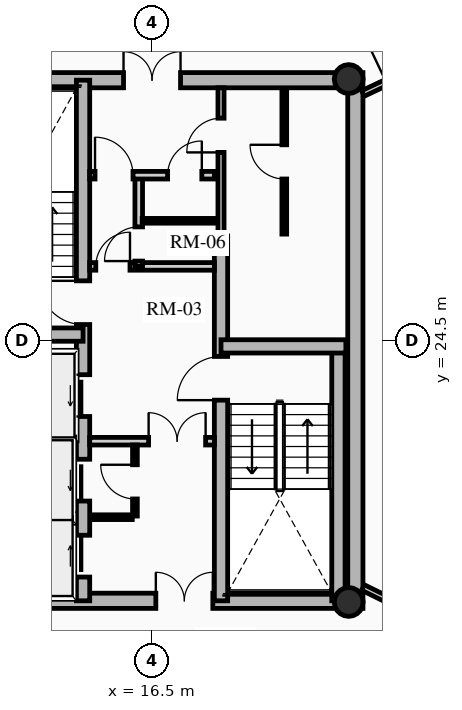
"""IFC4 building model, lengths in metres.
Left out: names, types, materials, properties, quantities, classifications, styles, units other than length and angle.
Written with IfcOpenShell. Run it as: python <this file> out.ifc"""

import sys

from ifc_helpers import new_model, si_unit, direction, frame, frame_2d, origin, origin_2d, place, context, subcontext, project, spatial, rectangle, hollow_circle, extrude, source, transform, mapped, element, fill, save


model = new_model("IFC4")
c1 = context("Model", 3, precision=1e-05, world=origin(), true_north=direction((0.0, 1.0)))
c2 = subcontext(c1, "Body", "Model", "MODEL_VIEW")
j1 = project(units=[si_unit("LENGTHUNIT", "METRE"), si_unit("PLANEANGLEUNIT", "RADIAN")], contexts=[c1])
p1 = place(None, origin())
s1 = spatial("IfcSite", under=j1, at=p1, CompositionType="ELEMENT")
p2 = place(p1, origin())
s2 = spatial("IfcBuilding", under=s1, at=p2, CompositionType="ELEMENT")
p3 = place(p2, frame((0.0, 0.0, 171.97)))
s3 = spatial("IfcBuildingStorey", under=s2, at=p3, CompositionType="ELEMENT", Elevation=171.97)
p4 = place(p3, frame((21.85, 17.45, 0.0), z_axis=(0.0, 0.0, 1.0), x_axis=(0.0, 1.0, 0.0)))
e1 = element("IfcWall", 1, at=p4, inside=s3, PredefinedType="SHEAR", context=c2, shape_type="SweptSolid", body=[
    extrude(rectangle(XDim=14.1, YDim=0.4, at=frame_2d((7.05, 0.0))), origin(), (0.0, 0.0, 1.0), 2.91),
])
p5 = place(p3, frame((11.15, 17.65, 0.0), z_axis=(0.0, 0.0, 1.0), x_axis=(1.0, 0.0, 0.0)))
e2 = element("IfcWall", 2, at=p5, inside=s3, PredefinedType="SHEAR", context=c2, shape_type="SweptSolid", body=[
    extrude(rectangle(XDim=10.7, YDim=0.4, at=frame_2d((5.35, 0.0))), origin(), (0.0, 0.0, 1.0), 2.91),
])
m1 = source(origin(), c2, "Body", "SweptSolid", [
    extrude(rectangle(XDim=1.5, YDim=2.02, at=frame_2d((0.75, 1.01))), frame((0.0, 0.21, 0.0), z_axis=(0.0, -1.0, 0.0), x_axis=(1.0, 0.0, 0.0)), (0.0, 0.0, 1.0), 0.42),
])
p6 = place(p5, frame((5.45, 0.0, 0.0)))
e3 = element("IfcOpeningElement", 3, at=p6, cuts=e2, PredefinedType="OPENING", context=c2, shape_type="MappedRepresentation", body=[
    mapped(m1, transform((0.0, 0.0, 0.0), x_axis=(1.0, 0.0, 0.0), y_axis=(0.0, 1.0, 0.0), z_axis=(0.0, 0.0, 1.0), scale=1.0)),
])
p7 = place(p3, frame((11.15, 31.35, 0.0), z_axis=(0.0, 0.0, 1.0), x_axis=(1.0, 0.0, 0.0)))
e4 = element("IfcWall", 4, at=p7, inside=s3, PredefinedType="SHEAR", context=c2, shape_type="SweptSolid", body=[
    extrude(rectangle(XDim=10.7, YDim=0.4, at=frame_2d((5.35, 0.0))), origin(), (0.0, 0.0, 1.0), 2.91),
])
p8 = place(p7, frame((4.6, 0.0, 0.0)))
e5 = element("IfcOpeningElement", 5, at=p8, cuts=e4, PredefinedType="OPENING", context=c2, shape_type="MappedRepresentation", body=[
    mapped(m1, transform((0.0, 0.0, 0.0), x_axis=(1.0, 0.0, 0.0), y_axis=(0.0, 1.0, 0.0), z_axis=(0.0, 0.0, 1.0), scale=1.0)),
])
p9 = place(p3, frame((14.685, 17.65, 0.0), z_axis=(0.0, 0.0, 1.0), x_axis=(0.0, 1.0, 0.0)))
e6 = element("IfcWall", 6, at=p9, inside=s3, PredefinedType="SHEAR", context=c2, shape_type="SweptSolid", body=[
    extrude(rectangle(XDim=13.7, YDim=0.35, at=frame_2d((6.85, 0.0))), origin(), (0.0, 0.0, 1.0), 2.91),
])
m2 = source(origin(), c2, "Body", "SweptSolid", [
    extrude(rectangle(XDim=1.1, YDim=2.015, at=frame_2d((0.55, 1.007))), frame((0.0, 0.185, 0.0), z_axis=(0.0, -1.0, 0.0), x_axis=(1.0, 0.0, 0.0)), (0.0, 0.0, 1.0), 0.37),
])
p10 = place(p9, frame((4.85, 0.0, 0.0)))
e7 = element("IfcOpeningElement", 7, at=p10, cuts=e6, PredefinedType="OPENING", context=c2, shape_type="MappedRepresentation", body=[
    mapped(m2, transform((0.0, 0.0, 0.0), x_axis=(1.0, 0.0, 0.0), y_axis=(0.0, 1.0, 0.0), z_axis=(0.0, 0.0, 1.0), scale=1.0)),
])
p11 = place(p9, frame((0.625, 0.0, 0.0)))
e8 = element("IfcOpeningElement", 8, at=p11, cuts=e6, PredefinedType="OPENING", context=c2, shape_type="MappedRepresentation", body=[
    mapped(m2, transform((0.0, 0.0, 0.0), x_axis=(1.0, 0.0, 0.0), y_axis=(0.0, 1.0, 0.0), z_axis=(0.0, 0.0, 1.0), scale=1.0)),
])
p12 = place(p9, frame((2.625, 0.0, 0.0)))
e9 = element("IfcOpeningElement", 9, at=p12, cuts=e6, PredefinedType="OPENING", context=c2, shape_type="MappedRepresentation", body=[
    mapped(m2, transform((0.0, 0.0, 0.0), x_axis=(1.0, 0.0, 0.0), y_axis=(0.0, 1.0, 0.0), z_axis=(0.0, 0.0, 1.0), scale=1.0)),
])
m3 = source(origin(), c2, "Body", "SweptSolid", [
    extrude(rectangle(XDim=1.15, YDim=2.02, at=frame_2d((0.575, 1.01))), frame((0.0, 0.185, 0.0), z_axis=(0.0, -1.0, 0.0), x_axis=(1.0, 0.0, 0.0)), (0.0, 0.0, 1.0), 0.37),
])
p13 = place(p9, frame((7.27, 0.0, 0.0)))
e10 = element("IfcOpeningElement", 10, at=p13, cuts=e6, PredefinedType="OPENING", context=c2, shape_type="MappedRepresentation", body=[
    mapped(m3, transform((0.0, 0.0, 0.0), x_axis=(1.0, 0.0, 0.0), y_axis=(0.0, 1.0, 0.0), z_axis=(0.0, 0.0, 1.0), scale=1.0)),
])
p14 = place(p3, frame((18.315, 17.65, 0.0), z_axis=(0.0, 0.0, 1.0), x_axis=(0.0, 1.0, 0.0)))
e11 = element("IfcWall", 11, at=p14, inside=s3, PredefinedType="SHEAR", context=c2, shape_type="SweptSolid", body=[
    extrude(rectangle(XDim=9.6, YDim=0.35, at=frame_2d((4.8, 0.0))), origin(), (0.0, 0.0, 1.0), 2.91),
])
p15 = place(p14, frame((5.28, 0.0, 0.0)))
e12 = element("IfcOpeningElement", 12, at=p15, cuts=e11, PredefinedType="OPENING", context=c2, shape_type="MappedRepresentation", body=[
    mapped(m3, transform((0.0, 0.0, 0.0), x_axis=(1.0, 0.0, 0.0), y_axis=(0.0, 1.0, 0.0), z_axis=(0.0, 0.0, 1.0), scale=1.0)),
])
p16 = place(p3, frame((11.4, 24.655, 0.0), z_axis=(0.0, 0.0, 1.0), x_axis=(1.0, 0.0, 0.0)))
e13 = element("IfcWall", 13, at=p16, inside=s3, PredefinedType="SHEAR", context=c2, shape_type="SweptSolid", body=[
    extrude(rectangle(XDim=3.285, YDim=0.35, at=frame_2d((1.643, 0.0))), origin(), (0.0, 0.0, 1.0), 2.91),
])
p17 = place(p3, frame((21.405, 17.65, 0.0), z_axis=(0.0, 0.0, 1.0), x_axis=(0.0, 1.0, 0.0)))
e14 = element("IfcWall", 14, at=p17, inside=s3, PredefinedType="SHEAR", context=c2, shape_type="SweptSolid", body=[
    extrude(rectangle(XDim=6.695, YDim=0.35, at=frame_2d((3.348, 0.0))), origin(), (0.0, 0.0, 1.0), 2.91),
])
p18 = place(p3, frame((18.315, 24.345, 0.0), z_axis=(0.0, 0.0, 1.0), x_axis=(1.0, 0.0, 0.0)))
e15 = element("IfcWall", 15, at=p18, inside=s3, PredefinedType="SHEAR", context=c2, shape_type="SweptSolid", body=[
    extrude(rectangle(XDim=3.285, YDim=0.35, at=frame_2d((1.643, 0.0))), origin(), (0.0, 0.0, 1.0), 2.91),
])
for number, where, z_axis, x_axis in (
    (16, (21.675, 17.62, 0.0), (0.0, 0.0, 1.0), (1.0, 0.0, 0.0)),
    (17, (21.675, 31.38, 0.0), (0.0, 0.0, 1.0), (1.0, 0.0, 0.0)),
):
    element("IfcColumn", number, at=place(p3, frame(where, z_axis=z_axis, x_axis=x_axis)), inside=s3, PredefinedType="COLUMN", context=c2, shape_type="SweptSolid", body=[
        extrude(hollow_circle(Radius=0.38, WallThickness=0.032, at=origin_2d()), origin(), (0.0, 0.0, 1.0), 2.91),
    ])
for number, where, z_axis, x_axis in (
    (18, (11.52, 21.8, 0.0), (0.0, 0.0, 1.0), (1.0, 0.0, 0.0)),
    (19, (11.52, 19.825, 0.0), (0.0, 0.0, 1.0), (1.0, 0.0, 0.0)),
):
    element("IfcWall", number, at=place(p3, frame(where, z_axis=z_axis, x_axis=x_axis)), inside=s3, PredefinedType="SHEAR", context=c2, shape_type="SweptSolid", body=[
        extrude(rectangle(XDim=2.97, YDim=0.2, at=frame_2d((1.485, 0.0))), origin(), (0.0, 0.0, 1.0), 2.91),
    ])
p19 = place(p3, frame((14.86, 21.85, 0.0), z_axis=(0.0, 0.0, 1.0), x_axis=(1.0, 0.0, 0.0)))
e20 = element("IfcWall", 20, at=p19, inside=s3, PredefinedType="PARTITIONING", context=c2, shape_type="SweptSolid", body=[
    extrude(rectangle(XDim=3.28, YDim=0.2, at=frame_2d((1.64, 0.0))), origin(), (0.0, 0.0, 1.0), 2.675),
])
m4 = source(origin(), c2, "Body", "SweptSolid", [
    extrude(rectangle(XDim=1.5, YDim=2.02, at=frame_2d((0.75, 1.01))), frame((0.0, 0.11, 0.0), z_axis=(0.0, -1.0, 0.0), x_axis=(1.0, 0.0, 0.0)), (0.0, 0.0, 1.0), 0.22),
])
p20 = place(p19, frame((1.55, 0.0, 0.0)))
e21 = element("IfcOpeningElement", 21, at=p20, cuts=e20, PredefinedType="OPENING", context=c2, shape_type="MappedRepresentation", body=[
    mapped(m4, transform((0.0, 0.0, 0.0), x_axis=(1.0, 0.0, 0.0), y_axis=(0.0, 1.0, 0.0), z_axis=(0.0, 0.0, 1.0), scale=1.0)),
])
p21 = place(p3, frame((14.86, 26.45, 0.0), z_axis=(0.0, 0.0, 1.0), x_axis=(1.0, 0.0, 0.0)))
e22 = element("IfcWall", 22, at=p21, inside=s3, PredefinedType="PARTITIONING", context=c2, shape_type="SweptSolid", body=[
    extrude(rectangle(XDim=3.28, YDim=0.2, at=frame_2d((1.64, 0.0))), origin(), (0.0, 0.0, 1.0), 2.675),
])
m5 = source(origin(), c2, "Body", "SweptSolid", [
    extrude(rectangle(XDim=0.9, YDim=2.005, at=frame_2d((0.45, 1.002))), frame((0.0, 0.11, 0.0), z_axis=(0.0, -1.0, 0.0), x_axis=(1.0, 0.0, 0.0)), (0.0, 0.0, 1.0), 0.22),
])
p22 = place(p21, frame((0.16, 0.0, 0.0)))
e23 = element("IfcOpeningElement", 23, at=p22, cuts=e22, PredefinedType="OPENING", context=c2, shape_type="MappedRepresentation", body=[
    mapped(m5, transform((0.0, 0.0, 0.0), x_axis=(1.0, 0.0, 0.0), y_axis=(0.0, 1.0, 0.0), z_axis=(0.0, 0.0, 1.0), scale=1.0)),
])
p23 = place(p3, frame((16.15, 26.45, 0.0), z_axis=(0.0, 0.0, 1.0), x_axis=(0.0, 1.0, 0.0)))
e24 = element("IfcWall", 24, at=p23, inside=s3, PredefinedType="PARTITIONING", context=c2, shape_type="SweptSolid", body=[
    extrude(rectangle(XDim=2.4, YDim=0.2, at=frame_2d((1.2, 0.0))), origin(), (0.0, 0.0, 1.0), 2.675),
])
p24 = place(p23, frame((0.14, 0.0, 0.0)))
e25 = element("IfcOpeningElement", 25, at=p24, cuts=e24, PredefinedType="OPENING", context=c2, shape_type="MappedRepresentation", body=[
    mapped(m5, transform((0.0, 0.0, 0.0), x_axis=(1.0, 0.0, 0.0), y_axis=(0.0, 1.0, 0.0), z_axis=(0.0, 0.0, 1.0), scale=1.0)),
])
p25 = place(p3, frame((14.86, 28.85, 0.0), z_axis=(0.0, 0.0, 1.0), x_axis=(1.0, 0.0, 0.0)))
e26 = element("IfcWall", 26, at=p25, inside=s3, PredefinedType="PARTITIONING", context=c2, shape_type="SweptSolid", body=[
    extrude(rectangle(XDim=3.28, YDim=0.2, at=frame_2d((1.64, 0.0))), origin(), (0.0, 0.0, 1.0), 2.675),
])
m6 = source(origin(), c2, "Body", "SweptSolid", [
    extrude(rectangle(XDim=1.0, YDim=2.015, at=frame_2d((0.5, 1.007))), frame((0.0, 0.11, 0.0), z_axis=(0.0, -1.0, 0.0), x_axis=(1.0, 0.0, 0.0)), (0.0, 0.0, 1.0), 0.22),
])
p26 = place(p25, frame((0.14, 0.0, 0.0)))
e27 = element("IfcOpeningElement", 27, at=p26, cuts=e26, PredefinedType="OPENING", context=c2, shape_type="MappedRepresentation", body=[
    mapped(m6, transform((0.0, 0.0, 0.0), x_axis=(1.0, 0.0, 0.0), y_axis=(0.0, 1.0, 0.0), z_axis=(0.0, 0.0, 1.0), scale=1.0)),
])
p27 = place(p25, frame((2.05, 0.0, 0.0)))
e28 = element("IfcOpeningElement", 28, at=p27, cuts=e26, PredefinedType="OPENING", context=c2, shape_type="MappedRepresentation", body=[
    mapped(m5, transform((0.0, 0.0, 0.0), x_axis=(1.0, 0.0, 0.0), y_axis=(0.0, 1.0, 0.0), z_axis=(0.0, 0.0, 1.0), scale=1.0)),
])
p28 = place(p3, frame((16.05, 19.88, 0.0), z_axis=(0.0, 0.0, 1.0), x_axis=(0.0, 1.0, 0.0)))
e29 = element("IfcWall", 29, at=p28, inside=s3, PredefinedType="PARTITIONING", context=c2, shape_type="SweptSolid", body=[
    extrude(rectangle(XDim=1.87, YDim=0.125, at=frame_2d((0.935, 0.0))), origin(), (0.0, 0.0, 1.0), 2.675),
])
m7 = source(origin(), c2, "Body", "SweptSolid", [
    extrude(rectangle(XDim=0.9, YDim=2.005, at=frame_2d((0.45, 1.002))), frame((0.0, 0.073, 0.0), z_axis=(0.0, -1.0, 0.0), x_axis=(1.0, 0.0, 0.0)), (0.0, 0.0, 1.0), 0.145),
])
p29 = place(p28, frame((0.45, 0.0, 0.0)))
e30 = element("IfcOpeningElement", 30, at=p29, cuts=e29, PredefinedType="OPENING", context=c2, shape_type="MappedRepresentation", body=[
    mapped(m7, transform((0.0, 0.0, 0.0), x_axis=(1.0, 0.0, 0.0), y_axis=(0.0, 1.0, 0.0), z_axis=(0.0, 0.0, 1.0), scale=1.0)),
])
p30 = place(p3, frame((14.88, 19.85, 0.0), z_axis=(0.0, 0.0, 1.0), x_axis=(1.0, 0.0, 0.0)))
e31 = element("IfcWall", 31, at=p30, inside=s3, PredefinedType="PARTITIONING", context=c2, shape_type="SweptSolid", body=[
    extrude(rectangle(XDim=1.1, YDim=0.125, at=frame_2d((0.55, 0.0))), origin(), (0.0, 0.0, 1.0), 2.675),
])
p31 = place(p3, frame((16.24, 27.65, 0.0), z_axis=(0.0, 0.0, 1.0), x_axis=(1.0, 0.0, 0.0)))
e32 = element("IfcWall", 32, at=p31, inside=s3, PredefinedType="PARTITIONING", context=c2, shape_type="SweptSolid", body=[
    extrude(rectangle(XDim=1.88, YDim=0.125, at=frame_2d((0.94, 0.0))), origin(), (0.0, 0.0, 1.0), 2.675),
])
p32 = place(p3, frame((18.315, 27.25, 0.0), z_axis=(0.0, 0.0, 1.0), x_axis=(0.0, 1.0, 0.0)))
e33 = element("IfcWall", 33, at=p32, inside=s3, PredefinedType="PARTITIONING", context=c2, shape_type="SweptSolid", body=[
    extrude(rectangle(XDim=3.9, YDim=0.16, at=frame_2d((1.95, 0.0))), origin(), (0.0, 0.0, 1.0), 2.675),
])
m8 = source(origin(), c2, "Body", "SweptSolid", [
    extrude(rectangle(XDim=0.9, YDim=2.005, at=frame_2d((0.45, 1.002))), frame((0.0, 0.09, 0.0), z_axis=(0.0, -1.0, 0.0), x_axis=(1.0, 0.0, 0.0)), (0.0, 0.0, 1.0), 0.18),
])
p33 = place(p32, frame((2.2, 0.0, 0.0)))
e34 = element("IfcOpeningElement", 34, at=p33, cuts=e33, PredefinedType="OPENING", context=c2, shape_type="MappedRepresentation", body=[
    mapped(m8, transform((0.0, 0.0, 0.0), x_axis=(1.0, 0.0, 0.0), y_axis=(0.0, 1.0, 0.0), z_axis=(0.0, 0.0, 1.0), scale=1.0)),
])
p34 = place(p3, frame((19.98, 27.3, 0.0), z_axis=(0.0, 0.0, 1.0), x_axis=(0.0, 1.0, 0.0)))
e35 = element("IfcWall", 35, at=p34, inside=s3, PredefinedType="PARTITIONING", context=c2, shape_type="SweptSolid", body=[
    extrude(rectangle(XDim=3.82, YDim=0.125, at=frame_2d((1.91, 0.0))), origin(), (0.0, 0.0, 1.0), 2.675),
])
p35 = place(p34, frame((1.45, 0.0, 0.0)))
e36 = element("IfcOpeningElement", 36, at=p35, cuts=e35, PredefinedType="OPENING", context=c2, shape_type="MappedRepresentation", body=[
    mapped(m7, transform((0.0, 0.0, 0.0), x_axis=(1.0, 0.0, 0.0), y_axis=(0.0, 1.0, 0.0), z_axis=(0.0, 0.0, 1.0), scale=1.0)),
])
p36 = place(p3, frame((22.05, 31.0, 0.0), z_axis=(0.0, 0.0, 1.0), x_axis=(0.90383570832, 0.427879670428, 0.0)))
e37 = element("IfcWall", 37, at=p36, inside=s3, PredefinedType="PARTITIONING", context=c2, shape_type="SweptSolid", body=[
    extrude(rectangle(XDim=1.93, YDim=0.16, at=frame_2d((0.965, 0.0))), origin(), (0.0, 0.0, 1.0), 2.245),
])
m9 = source(origin(), c2, "Body", "SweptSolid", [
    extrude(rectangle(XDim=1.05, YDim=2.015, at=frame_2d((0.525, 1.007))), frame((0.0, 0.09, 0.0), z_axis=(0.0, -1.0, 0.0), x_axis=(1.0, 0.0, 0.0)), (0.0, 0.0, 1.0), 0.18),
])
p37 = place(p36, frame((0.68, 0.0, 0.0)))
e38 = element("IfcOpeningElement", 38, at=p37, cuts=e37, PredefinedType="OPENING", context=c2, shape_type="MappedRepresentation", body=[
    mapped(m9, transform((0.0, 0.0, 0.0), x_axis=(1.0, 0.0, 0.0), y_axis=(0.0, 1.0, 0.0), z_axis=(0.0, 0.0, 1.0), scale=1.0)),
])
p38 = place(p3, frame((22.05, 18.0, 0.0), z_axis=(0.0, 0.0, 1.0), x_axis=(0.897159648657, -0.441706423795, 0.0)))
e39 = element("IfcWall", 39, at=p38, inside=s3, PredefinedType="PARTITIONING", context=c2, shape_type="SweptSolid", body=[
    extrude(rectangle(XDim=2.025, YDim=0.16, at=frame_2d((1.012, 0.0))), origin(), (0.0, 0.0, 1.0), 2.245),
])
p39 = place(p38, frame((0.775, 0.0, 0.0)))
e40 = element("IfcOpeningElement", 40, at=p39, cuts=e39, PredefinedType="OPENING", context=c2, shape_type="MappedRepresentation", body=[
    mapped(m9, transform((0.0, 0.0, 0.0), x_axis=(1.0, 0.0, 0.0), y_axis=(0.0, 1.0, 0.0), z_axis=(0.0, 0.0, 1.0), scale=1.0)),
])
m10 = source(origin(), c2, "Body", "SweptSolid", [
    extrude(rectangle(XDim=1.1, YDim=2.015, at=frame_2d((0.55, 1.007))), frame((0.0, 0.025, 0.0), z_axis=(0.0, -1.0, 0.0), x_axis=(1.0, 0.0, 0.0)), (0.0, 0.0, 1.0), 0.05),
])
p40 = place(p10, origin())
e41 = element("IfcDoor", 41, at=p40, inside=s3, OperationType="SLIDING_TO_LEFT", PredefinedType="DOOR", context=c2, shape_type="MappedRepresentation", body=[
    mapped(m10, transform((0.0, 0.0, 0.0), x_axis=(1.0, 0.0, 0.0), y_axis=(0.0, 1.0, 0.0), z_axis=(0.0, 0.0, 1.0), scale=1.0)),
])
fill(e7, e41)
p41 = place(p11, origin())
e42 = element("IfcDoor", 42, at=p41, inside=s3, OperationType="SLIDING_TO_RIGHT", PredefinedType="DOOR", context=c2, shape_type="MappedRepresentation", body=[
    mapped(m10, transform((0.0, 0.0, 0.0), x_axis=(1.0, 0.0, 0.0), y_axis=(0.0, 1.0, 0.0), z_axis=(0.0, 0.0, 1.0), scale=1.0)),
])
fill(e8, e42)
p42 = place(p12, origin())
e43 = element("IfcDoor", 43, at=p42, inside=s3, OperationType="SLIDING_TO_LEFT", PredefinedType="DOOR", context=c2, shape_type="MappedRepresentation", body=[
    mapped(m10, transform((0.0, 0.0, 0.0), x_axis=(1.0, 0.0, 0.0), y_axis=(0.0, 1.0, 0.0), z_axis=(0.0, 0.0, 1.0), scale=1.0)),
])
fill(e9, e43)
m11 = source(origin(), c2, "Body", "SweptSolid", [
    extrude(rectangle(XDim=1.15, YDim=2.02, at=frame_2d((0.575, 1.01))), frame((0.0, 0.025, 0.0), z_axis=(0.0, -1.0, 0.0), x_axis=(1.0, 0.0, 0.0)), (0.0, 0.0, 1.0), 0.05),
])
p43 = place(p13, origin())
e44 = element("IfcDoor", 44, at=p43, inside=s3, OperationType="SINGLE_SWING_RIGHT", PredefinedType="DOOR", context=c2, shape_type="MappedRepresentation", body=[
    mapped(m11, transform((0.0, 0.0, 0.0), x_axis=(1.0, 0.0, 0.0), y_axis=(0.0, 1.0, 0.0), z_axis=(0.0, 0.0, 1.0), scale=1.0)),
])
fill(e10, e44)
p44 = place(p15, origin())
e45 = element("IfcDoor", 45, at=p44, inside=s3, OperationType="SINGLE_SWING_LEFT", PredefinedType="DOOR", context=c2, shape_type="MappedRepresentation", body=[
    mapped(m11, transform((0.0, 0.0, 0.0), x_axis=(1.0, 0.0, 0.0), y_axis=(0.0, 1.0, 0.0), z_axis=(0.0, 0.0, 1.0), scale=1.0)),
])
fill(e12, e45)
m12 = source(origin(), c2, "Body", "SweptSolid", [
    extrude(rectangle(XDim=1.5, YDim=2.02, at=frame_2d((0.75, 1.01))), frame((0.0, 0.025, 0.0), z_axis=(0.0, -1.0, 0.0), x_axis=(1.0, 0.0, 0.0)), (0.0, 0.0, 1.0), 0.05),
])
p45 = place(p8, origin())
e46 = element("IfcDoor", 46, at=p45, inside=s3, OperationType="DOUBLE_DOOR_SINGLE_SWING", PredefinedType="DOOR", context=c2, shape_type="MappedRepresentation", body=[
    mapped(m12, transform((0.0, 0.0, 0.0), x_axis=(1.0, 0.0, 0.0), y_axis=(0.0, 1.0, 0.0), z_axis=(0.0, 0.0, 1.0), scale=1.0)),
])
fill(e5, e46)
p46 = place(p6, origin())
e47 = element("IfcDoor", 47, at=p46, inside=s3, OperationType="DOUBLE_DOOR_SINGLE_SWING", PredefinedType="DOOR", context=c2, shape_type="MappedRepresentation", body=[
    mapped(m12, transform((0.0, 0.0, 0.0), x_axis=(1.0, 0.0, 0.0), y_axis=(0.0, 1.0, 0.0), z_axis=(0.0, 0.0, 1.0), scale=1.0)),
])
fill(e3, e47)
p47 = place(p20, origin())
e48 = element("IfcDoor", 48, at=p47, inside=s3, OperationType="DOUBLE_DOOR_SINGLE_SWING", PredefinedType="DOOR", context=c2, shape_type="MappedRepresentation", body=[
    mapped(m12, transform((0.0, 0.0, 0.0), x_axis=(1.0, 0.0, 0.0), y_axis=(0.0, 1.0, 0.0), z_axis=(0.0, 0.0, 1.0), scale=1.0)),
])
fill(e21, e48)
m13 = source(origin(), c2, "Body", "SweptSolid", [
    extrude(rectangle(XDim=0.9, YDim=2.005, at=frame_2d((0.45, 1.002))), frame((0.0, 0.025, 0.0), z_axis=(0.0, -1.0, 0.0), x_axis=(1.0, 0.0, 0.0)), (0.0, 0.0, 1.0), 0.05),
])
p48 = place(p22, origin())
e49 = element("IfcDoor", 49, at=p48, inside=s3, OperationType="SINGLE_SWING_RIGHT", PredefinedType="DOOR", context=c2, shape_type="MappedRepresentation", body=[
    mapped(m13, transform((0.0, 0.0, 0.0), x_axis=(1.0, 0.0, 0.0), y_axis=(0.0, 1.0, 0.0), z_axis=(0.0, 0.0, 1.0), scale=1.0)),
])
fill(e23, e49)
m14 = source(origin(), c2, "Body", "SweptSolid", [
    extrude(rectangle(XDim=1.0, YDim=2.015, at=frame_2d((0.5, 1.007))), frame((0.0, 0.025, 0.0), z_axis=(0.0, -1.0, 0.0), x_axis=(1.0, 0.0, 0.0)), (0.0, 0.0, 1.0), 0.05),
])
p49 = place(p26, origin())
e50 = element("IfcDoor", 50, at=p49, inside=s3, OperationType="SINGLE_SWING_LEFT", PredefinedType="DOOR", context=c2, shape_type="MappedRepresentation", body=[
    mapped(m14, transform((0.0, 0.0, 0.0), x_axis=(1.0, 0.0, 0.0), y_axis=(0.0, 1.0, 0.0), z_axis=(0.0, 0.0, 1.0), scale=1.0)),
])
fill(e27, e50)
p50 = place(p29, origin())
e51 = element("IfcDoor", 51, at=p50, inside=s3, OperationType="SINGLE_SWING_RIGHT", PredefinedType="DOOR", context=c2, shape_type="MappedRepresentation", body=[
    mapped(m13, transform((0.0, 0.0, 0.0), x_axis=(1.0, 0.0, 0.0), y_axis=(0.0, 1.0, 0.0), z_axis=(0.0, 0.0, 1.0), scale=1.0)),
])
fill(e30, e51)
p51 = place(p24, origin())
e52 = element("IfcDoor", 52, at=p51, inside=s3, OperationType="SINGLE_SWING_LEFT", PredefinedType="DOOR", context=c2, shape_type="MappedRepresentation", body=[
    mapped(m13, transform((0.0, 0.0, 0.0), x_axis=(1.0, 0.0, 0.0), y_axis=(0.0, 1.0, 0.0), z_axis=(0.0, 0.0, 1.0), scale=1.0)),
])
fill(e25, e52)
p52 = place(p27, origin())
e53 = element("IfcDoor", 53, at=p52, inside=s3, OperationType="SINGLE_SWING_RIGHT", PredefinedType="DOOR", context=c2, shape_type="MappedRepresentation", body=[
    mapped(m13, transform((0.0, 0.0, 0.0), x_axis=(1.0, 0.0, 0.0), y_axis=(0.0, 1.0, 0.0), z_axis=(0.0, 0.0, 1.0), scale=1.0)),
])
fill(e28, e53)
p53 = place(p33, origin())
e54 = element("IfcDoor", 54, at=p53, inside=s3, OperationType="SINGLE_SWING_LEFT", PredefinedType="DOOR", context=c2, shape_type="MappedRepresentation", body=[
    mapped(m13, transform((0.0, 0.0, 0.0), x_axis=(1.0, 0.0, 0.0), y_axis=(0.0, 1.0, 0.0), z_axis=(0.0, 0.0, 1.0), scale=1.0)),
])
fill(e34, e54)
p54 = place(p35, origin())
e55 = element("IfcDoor", 55, at=p54, inside=s3, OperationType="SINGLE_SWING_RIGHT", PredefinedType="DOOR", context=c2, shape_type="MappedRepresentation", body=[
    mapped(m13, transform((0.0, 0.0, 0.0), x_axis=(1.0, 0.0, 0.0), y_axis=(0.0, 1.0, 0.0), z_axis=(0.0, 0.0, 1.0), scale=1.0)),
])
fill(e36, e55)
save(model, sys.argv[1])
